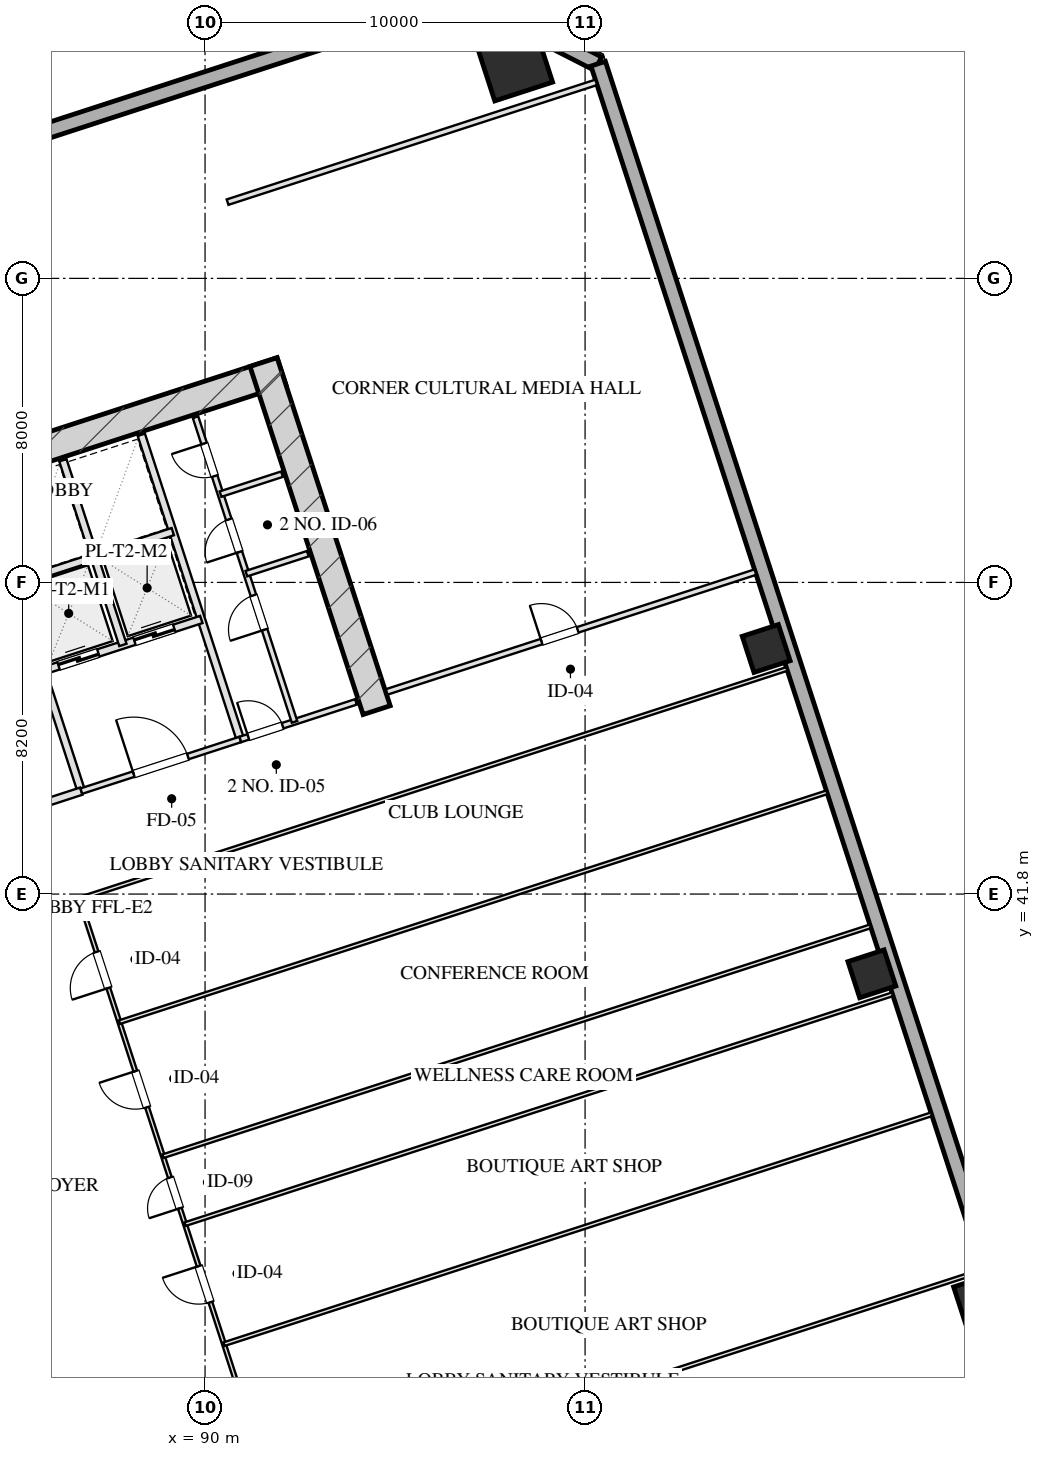
"""IFC4 building model, lengths in metres.
Left out: names, types, materials, properties, quantities, classifications, styles, units other than length and angle.
Written with IfcOpenShell. Run it as: python <this file> out.ifc"""

import sys

from ifc_helpers import new_model, si_unit, direction, frame, frame_2d, origin, origin_2d, place, context, subcontext, project, spatial, rectangle, hollow_rectangle, extrude, element, fill, save


model = new_model("IFC4")
c1 = context("Model", 3, precision=1e-05, world=origin(), true_north=direction((0.0, 1.0)))
c2 = subcontext(c1, "Body", "Model", "MODEL_VIEW")
j1 = project(units=[si_unit("LENGTHUNIT", "METRE"), si_unit("PLANEANGLEUNIT", "RADIAN")], contexts=[c1])
p1 = place(None, origin())
s1 = spatial("IfcSite", under=j1, at=p1, CompositionType="ELEMENT")
p2 = place(p1, origin())
s2 = spatial("IfcBuilding", under=s1, at=p2, CompositionType="ELEMENT")
p3 = place(p2, frame((0.0, 0.0, 74.75)))
s3 = spatial("IfcBuildingStorey", under=s2, at=p3, CompositionType="ELEMENT", Elevation=74.75)
p4 = place(p3, frame((76.272, 50.443, 0.0), z_axis=(0.0, 0.0, 1.0), x_axis=(0.951056072937, 0.309018358888, 0.0)))
e1 = element("IfcWall", 1, at=p4, inside=s3, PredefinedType="SHEAR", context=c2, shape_type="SweptSolid", body=[
    extrude(rectangle(XDim=16.55, YDim=0.75, at=frame_2d((8.275, 0.0))), origin(), (0.0, 0.0, 1.0), 3.45),
])
p5 = place(p3, frame((94.515, 46.639, 0.0), z_axis=(0.0, 0.0, 1.0), x_axis=(-0.309016134813, 0.951056795583, 0.0)))
e2 = element("IfcWall", 2, at=p5, inside=s3, PredefinedType="SHEAR", context=c2, shape_type="SweptSolid", body=[
    extrude(rectangle(XDim=9.63, YDim=0.75, at=frame_2d((4.815, 0.0))), origin(), (0.0, 0.0, 1.0), 3.45),
])
p6 = place(p3, frame((98.137, 63.677, 0.0), z_axis=(0.0, 0.0, 1.0), x_axis=(0.951056516295, 0.309016994375, 0.0)))
e3 = element("IfcColumn", 3, at=p6, inside=s3, PredefinedType="COLUMN", context=c2, shape_type="SweptSolid", body=[
    extrude(hollow_rectangle(XDim=1.6, YDim=1.6, WallThickness=0.055, at=origin_2d()), origin(), (0.0, 0.0, 1.0), 3.451),
])
for number, where, z_axis, x_axis in (
    (4, (110.328, 31.142, 0.0), (0.0, 0.0, 1.0), (0.951, 0.309, 0.0)),
    (5, (107.547, 39.701, 0.0), (0.0, 0.0, 1.0), (0.951, 0.309, 0.0)),
    (6, (104.766, 48.261, 0.0), (0.0, 0.0, 1.0), (0.951, 0.309, 0.0)),
):
    element("IfcColumn", number, at=place(p3, frame(where, z_axis=z_axis, x_axis=x_axis)), inside=s3, PredefinedType="COLUMN", context=c2, shape_type="SweptSolid", body=[
        extrude(hollow_rectangle(XDim=1.0, YDim=1.0, WallThickness=0.036, at=origin_2d()), origin(), (0.0, 0.0, 1.0), 3.451),
    ])
p7 = place(p3, frame((66.002, 55.433, 0.0), z_axis=(0.0, 0.0, 1.0), x_axis=(0.951055939317, 0.309018770125, 0.0)))
e7 = element("IfcWall", 7, at=p7, inside=s3, PredefinedType="SOLIDWALL", context=c2, shape_type="SweptSolid", body=[
    extrude(rectangle(XDim=32.4, YDim=0.4, at=frame_2d((16.2, 0.0))), origin(), (0.0, 0.0, 1.0), 2.61),
])
p8 = place(p3, frame((96.816, 65.446, 0.0), z_axis=(0.0, 0.0, 1.0), x_axis=(0.890998089617, -0.454007053137, 0.0)))
e8 = element("IfcWall", 8, at=p8, inside=s3, PredefinedType="SOLIDWALL", context=c2, shape_type="SweptSolid", body=[
    extrude(rectangle(XDim=3.96, YDim=0.4, at=frame_2d((1.98, 0.0))), origin(), (0.0, 0.0, 1.0), 2.61),
])
p9 = place(p3, frame((100.345, 63.648, 0.0), z_axis=(0.0, 0.0, 1.0), x_axis=(0.309014526607, -0.951057318118, 0.0)))
e9 = element("IfcWall", 9, at=p9, inside=s3, PredefinedType="SOLIDWALL", context=c2, shape_type="SweptSolid", body=[
    extrude(rectangle(XDim=50.0, YDim=0.4, at=frame_2d((25.0, 0.0))), origin(), (0.0, 0.0, 1.0), 2.61),
])
p10 = place(p3, frame((86.743, 44.508, 0.0), z_axis=(0.0, 0.0, 1.0), x_axis=(-0.309016001439, 0.951056838919, 0.0)))
e10 = element("IfcWall", 10, at=p10, inside=s3, PredefinedType="PARTITIONING", context=c2, shape_type="SweptSolid", body=[
    extrude(rectangle(XDim=8.43, YDim=0.2, at=frame_2d((4.215, 0.0))), origin(), (0.0, 0.0, 1.0), 3.175),
])
p11 = place(p3, frame((83.101, 43.324, 0.0), z_axis=(0.0, 0.0, 1.0), x_axis=(0.951052804469, 0.309028417967, 0.0)))
e11 = element("IfcWall", 11, at=p11, inside=s3, PredefinedType="PARTITIONING", context=c2, shape_type="SweptSolid", body=[
    extrude(rectangle(XDim=3.83, YDim=0.2, at=frame_2d((1.915, 0.0))), origin(), (0.0, 0.0, 1.0), 3.175),
])
p12 = place(p11, frame((1.35, 0.0, 0.0)))
e12 = element("IfcOpeningElement", 12, at=p12, cuts=e11, PredefinedType="OPENING", context=c2, shape_type="SweptSolid", body=[
    extrude(rectangle(XDim=1.2, YDim=2.05, at=frame_2d((0.6, 1.025))), frame((0.0, 0.11, 0.0), z_axis=(0.0, -1.0, 0.0), x_axis=(1.0, 0.0, 0.0)), (0.0, 0.0, 1.0), 0.22),
])
p13 = place(p3, frame((90.928, 45.868, 0.0), z_axis=(0.0, 0.0, 1.0), x_axis=(-0.309042196757, 0.951048327176, 0.0)))
e13 = element("IfcWall", 13, at=p13, inside=s3, PredefinedType="PARTITIONING", context=c2, shape_type="SweptSolid", body=[
    extrude(rectangle(XDim=8.43, YDim=0.2, at=frame_2d((4.215, 0.0))), origin(), (0.0, 0.0, 1.0), 3.175),
])
p14 = place(p3, frame((86.743, 44.508, 0.0), z_axis=(0.0, 0.0, 1.0), x_axis=(0.951063829732, 0.308994485023, 0.0)))
e14 = element("IfcWall", 14, at=p14, inside=s3, PredefinedType="PARTITIONING", context=c2, shape_type="SweptSolid", body=[
    extrude(rectangle(XDim=4.4, YDim=0.15, at=frame_2d((2.2, 0.0))), origin(), (0.0, 0.0, 1.0), 3.175),
])
p15 = place(p14, frame((1.45, 0.0, 0.0)))
e15 = element("IfcOpeningElement", 15, at=p15, cuts=e14, PredefinedType="OPENING", context=c2, shape_type="SweptSolid", body=[
    extrude(rectangle(XDim=1.5, YDim=2.05, at=frame_2d((0.75, 1.025))), frame((0.0, 0.085, 0.0), z_axis=(0.0, -1.0, 0.0), x_axis=(1.0, 0.0, 0.0)), (0.0, 0.0, 1.0), 0.17),
])
p16 = place(p3, frame((85.718, 47.666, 0.0), z_axis=(0.0, 0.0, 1.0), x_axis=(0.951058531764, 0.30901079133, 0.0)))
e16 = element("IfcWall", 16, at=p16, inside=s3, PredefinedType="PARTITIONING", context=c2, shape_type="SweptSolid", body=[
    extrude(rectangle(XDim=4.4, YDim=0.2, at=frame_2d((2.2, 0.0))), origin(), (0.0, 0.0, 1.0), 3.175),
])
p17 = place(p16, frame((0.45, 0.0, 0.0)))
e17 = element("IfcOpeningElement", 17, at=p17, cuts=e16, PredefinedType="OPENING", context=c2, shape_type="SweptSolid", body=[
    extrude(rectangle(XDim=1.1, YDim=2.05, at=frame_2d((0.55, 1.025))), frame((0.0, 0.11, 0.0), z_axis=(0.0, -1.0, 0.0), x_axis=(1.0, 0.0, 0.0)), (0.0, 0.0, 1.0), 0.22),
])
p18 = place(p16, frame((2.55, 0.0, 0.0)))
e18 = element("IfcOpeningElement", 18, at=p18, cuts=e16, PredefinedType="OPENING", context=c2, shape_type="SweptSolid", body=[
    extrude(rectangle(XDim=1.1, YDim=2.05, at=frame_2d((0.55, 1.025))), frame((0.0, 0.11, 0.0), z_axis=(0.0, -1.0, 0.0), x_axis=(1.0, 0.0, 0.0)), (0.0, 0.0, 1.0), 0.22),
])
p19 = place(p3, frame((87.838, 48.354, 0.0), z_axis=(0.0, 0.0, 1.0), x_axis=(-0.3090093719, 0.951058992953, 0.0)))
e19 = element("IfcWall", 19, at=p19, inside=s3, PredefinedType="PARTITIONING", context=c2, shape_type="SweptSolid", body=[
    extrude(rectangle(XDim=5.11, YDim=0.2, at=frame_2d((2.555, 0.0))), origin(), (0.0, 0.0, 1.0), 3.175),
])
p20 = place(p3, frame((84.967, 49.977, 0.0), z_axis=(0.0, 0.0, 1.0), x_axis=(0.951063829732, 0.308994485023, 0.0)))
e20 = element("IfcWall", 20, at=p20, inside=s3, PredefinedType="PARTITIONING", context=c2, shape_type="SweptSolid", body=[
    extrude(rectangle(XDim=4.4, YDim=0.2, at=frame_2d((2.2, 0.0))), origin(), (0.0, 0.0, 1.0), 3.175),
])
p21 = place(p3, frame((90.928, 45.868, 0.0), z_axis=(0.0, 0.0, 1.0), x_axis=(0.951059297078, 0.309008435874, 0.0)))
e21 = element("IfcWall", 21, at=p21, inside=s3, PredefinedType="PARTITIONING", context=c2, shape_type="SweptSolid", body=[
    extrude(rectangle(XDim=3.2, YDim=0.15, at=frame_2d((1.6, 0.0))), origin(), (0.0, 0.0, 1.0), 3.175),
])
p22 = place(p21, frame((0.22, 0.0, 0.0)))
e22 = element("IfcOpeningElement", 22, at=p22, cuts=e21, PredefinedType="OPENING", context=c2, shape_type="SweptSolid", body=[
    extrude(rectangle(XDim=0.95, YDim=2.05, at=frame_2d((0.475, 1.025))), frame((0.0, 0.085, 0.0), z_axis=(0.0, -1.0, 0.0), x_axis=(1.0, 0.0, 0.0)), (0.0, 0.0, 1.0), 0.17),
])
p23 = place(p3, frame((92.355, 46.331, 0.0), z_axis=(0.0, 0.0, 1.0), x_axis=(-0.309007490203, 0.951059604335, 0.0)))
e23 = element("IfcWall", 23, at=p23, inside=s3, PredefinedType="PARTITIONING", context=c2, shape_type="SweptSolid", body=[
    extrude(rectangle(XDim=8.43, YDim=0.15, at=frame_2d((4.215, 0.0))), origin(), (0.0, 0.0, 1.0), 3.175),
])
p24 = place(p23, frame((2.55, 0.0, 0.0)))
e24 = element("IfcOpeningElement", 24, at=p24, cuts=e23, PredefinedType="OPENING", context=c2, shape_type="SweptSolid", body=[
    extrude(rectangle(XDim=0.95, YDim=2.05, at=frame_2d((0.475, 1.025))), frame((0.0, 0.085, 0.0), z_axis=(0.0, -1.0, 0.0), x_axis=(1.0, 0.0, 0.0)), (0.0, 0.0, 1.0), 0.17),
])
p25 = place(p23, frame((4.7, 0.0, 0.0)))
e25 = element("IfcOpeningElement", 25, at=p25, cuts=e23, PredefinedType="OPENING", context=c2, shape_type="SweptSolid", body=[
    extrude(rectangle(XDim=0.9, YDim=2.05, at=frame_2d((0.45, 1.025))), frame((0.0, 0.085, 0.0), z_axis=(0.0, -1.0, 0.0), x_axis=(1.0, 0.0, 0.0)), (0.0, 0.0, 1.0), 0.17),
])
p26 = place(p23, frame((6.8, 0.0, 0.0)))
e26 = element("IfcOpeningElement", 26, at=p26, cuts=e23, PredefinedType="OPENING", context=c2, shape_type="SweptSolid", body=[
    extrude(rectangle(XDim=0.9, YDim=2.05, at=frame_2d((0.45, 1.025))), frame((0.0, 0.085, 0.0), z_axis=(0.0, -1.0, 0.0), x_axis=(1.0, 0.0, 0.0)), (0.0, 0.0, 1.0), 0.17),
])
p27 = place(p3, frame((91.088, 50.23, 0.0), z_axis=(0.0, 0.0, 1.0), x_axis=(0.951054116971, 0.309024378638, 0.0)))
e27 = element("IfcWall", 27, at=p27, inside=s3, PredefinedType="PARTITIONING", context=c2, shape_type="SweptSolid", body=[
    extrude(rectangle(XDim=1.7, YDim=0.15, at=frame_2d((0.85, 0.0))), origin(), (0.0, 0.0, 1.0), 3.175),
])
p28 = place(p3, frame((90.408, 52.323, 0.0), z_axis=(0.0, 0.0, 1.0), x_axis=(0.951040401051, 0.309066587596, 0.0)))
e28 = element("IfcWall", 28, at=p28, inside=s3, PredefinedType="PARTITIONING", context=c2, shape_type="SweptSolid", body=[
    extrude(rectangle(XDim=1.7, YDim=0.15, at=frame_2d((0.85, 0.0))), origin(), (0.0, 0.0, 1.0), 3.175),
])
p29 = place(p3, frame((101.578, 26.196, 0.0), z_axis=(0.0, 0.0, 1.0), x_axis=(0.951059043131, 0.309009217467, 0.0)))
e29 = element("IfcWall", 29, at=p29, inside=s3, PredefinedType="PARTITIONING", context=c2, shape_type="SweptSolid", body=[
    extrude(rectangle(XDim=10.2, YDim=0.15, at=frame_2d((5.1, 0.0))), origin(), (0.0, 0.0, 1.0), 2.15),
])
p30 = place(p29, frame((4.284, 0.0, 0.0)))
e30 = element("IfcOpeningElement", 30, at=p30, cuts=e29, PredefinedType="OPENING", context=c2, shape_type="SweptSolid", body=[
    extrude(rectangle(XDim=1.0, YDim=2.05, at=frame_2d((0.5, 1.025))), frame((0.0, 0.085, 0.0), z_axis=(0.0, -1.0, 0.0), x_axis=(1.0, 0.0, 0.0)), (0.0, 0.0, 1.0), 0.17),
])
p31 = place(p3, frame((90.593, 60.006, 0.0), z_axis=(0.0, 0.0, 1.0), x_axis=(0.951059043131, 0.309009217467, 0.0)))
e31 = element("IfcWall", 31, at=p31, inside=s3, PredefinedType="PARTITIONING", context=c2, shape_type="SweptSolid", body=[
    extrude(rectangle(XDim=10.2, YDim=0.15, at=frame_2d((5.1, 0.0))), origin(), (0.0, 0.0, 1.0), 3.175),
])
p32 = place(p3, frame((94.78, 47.119, 0.0), z_axis=(0.0, 0.0, 1.0), x_axis=(0.951054294345, 0.309023832749, 0.0)))
e32 = element("IfcWall", 32, at=p32, inside=s3, PredefinedType="PARTITIONING", context=c2, shape_type="SweptSolid", body=[
    extrude(rectangle(XDim=10.2, YDim=0.15, at=frame_2d((5.1, 0.0))), origin(), (0.0, 0.0, 1.0), 2.15),
])
p33 = place(p32, frame((4.284, 0.0, 0.0)))
e33 = element("IfcOpeningElement", 33, at=p33, cuts=e32, PredefinedType="OPENING", context=c2, shape_type="SweptSolid", body=[
    extrude(rectangle(XDim=1.0, YDim=2.05, at=frame_2d((0.5, 1.025))), frame((0.0, 0.085, 0.0), z_axis=(0.0, -1.0, 0.0), x_axis=(1.0, 0.0, 0.0)), (0.0, 0.0, 1.0), 0.17),
])
for number, where, z_axis, x_axis in (
    (34, (91.834, 25.848, 0.0), (0.0, 0.0, 1.0), (0.951, 0.309, 0.0)),
    (35, (86.692, 41.673, 0.0), (0.0, 0.0, 1.0), (0.951, 0.309, 0.0)),
):
    element("IfcWall", number, at=place(p3, frame(where, z_axis=z_axis, x_axis=x_axis)), inside=s3, PredefinedType="MOVABLE", context=c2, shape_type="SweptSolid", body=[
        extrude(rectangle(XDim=19.575, YDim=0.1, at=frame_2d((9.788, 0.0))), origin(), (0.0, 0.0, 1.0), 3.175),
    ])
p34 = place(p3, frame((87.412, 24.411, 0.0), z_axis=(0.0, 0.0, 1.0), x_axis=(-0.309022042254, 0.951054876125, 0.0)))
e36 = element("IfcWall", 36, at=p34, inside=s3, PredefinedType="MOVABLE", context=c2, shape_type="SweptSolid", body=[
    extrude(rectangle(XDim=16.64, YDim=0.1, at=frame_2d((8.32, 0.0))), origin(), (0.0, 0.0, 1.0), 3.175),
])
p35 = place(p34, frame((3.32, 0.0, 0.0)))
e37 = element("IfcOpeningElement", 37, at=p35, cuts=e36, PredefinedType="OPENING", context=c2, shape_type="SweptSolid", body=[
    extrude(rectangle(XDim=1.0, YDim=2.05, at=frame_2d((0.5, 1.025))), frame((0.0, 0.06, 0.0), z_axis=(0.0, -1.0, 0.0), x_axis=(1.0, 0.0, 0.0)), (0.0, 0.0, 1.0), 0.12),
])
p36 = place(p34, frame((11.64, 0.0, 0.0)))
e38 = element("IfcOpeningElement", 38, at=p36, cuts=e36, PredefinedType="OPENING", context=c2, shape_type="SweptSolid", body=[
    extrude(rectangle(XDim=1.0, YDim=2.05, at=frame_2d((0.5, 1.025))), frame((0.0, 0.06, 0.0), z_axis=(0.0, -1.0, 0.0), x_axis=(1.0, 0.0, 0.0)), (0.0, 0.0, 1.0), 0.12),
])
p37 = place(p3, frame((91.834, 25.848, 0.0), z_axis=(0.0, 0.0, 1.0), x_axis=(-0.30901773025, 0.951056277195, 0.0)))
e39 = element("IfcWall", 39, at=p37, inside=s3, PredefinedType="MOVABLE", context=c2, shape_type="SweptSolid", body=[
    extrude(rectangle(XDim=16.64, YDim=0.1, at=frame_2d((8.32, 0.0))), origin(), (0.0, 0.0, 1.0), 3.175),
])
p38 = place(p37, frame((1.16, 0.0, 0.0)))
e40 = element("IfcOpeningElement", 40, at=p38, cuts=e39, PredefinedType="OPENING", context=c2, shape_type="SweptSolid", body=[
    extrude(rectangle(XDim=1.05, YDim=2.05, at=frame_2d((0.525, 1.025))), frame((0.0, 0.06, 0.0), z_axis=(0.0, -1.0, 0.0), x_axis=(1.0, 0.0, 0.0)), (0.0, 0.0, 1.0), 0.12),
])
p39 = place(p37, frame((5.48, 0.0, 0.0)))
e41 = element("IfcOpeningElement", 41, at=p39, cuts=e39, PredefinedType="OPENING", context=c2, shape_type="SweptSolid", body=[
    extrude(rectangle(XDim=1.0, YDim=2.05, at=frame_2d((0.5, 1.025))), frame((0.0, 0.06, 0.0), z_axis=(0.0, -1.0, 0.0), x_axis=(1.0, 0.0, 0.0)), (0.0, 0.0, 1.0), 0.12),
])
p40 = place(p37, frame((8.08, 0.0, 0.0)))
e42 = element("IfcOpeningElement", 42, at=p40, cuts=e39, PredefinedType="OPENING", context=c2, shape_type="SweptSolid", body=[
    extrude(rectangle(XDim=0.85, YDim=2.05, at=frame_2d((0.425, 1.025))), frame((0.0, 0.06, 0.0), z_axis=(0.0, -1.0, 0.0), x_axis=(1.0, 0.0, 0.0)), (0.0, 0.0, 1.0), 0.12),
])
p41 = place(p37, frame((10.874, 0.0, 0.0)))
e43 = element("IfcOpeningElement", 43, at=p41, cuts=e39, PredefinedType="OPENING", context=c2, shape_type="SweptSolid", body=[
    extrude(rectangle(XDim=1.0, YDim=2.05, at=frame_2d((0.5, 1.025))), frame((0.0, 0.06, 0.0), z_axis=(0.0, -1.0, 0.0), x_axis=(1.0, 0.0, 0.0)), (0.0, 0.0, 1.0), 0.12),
])
p42 = place(p37, frame((14.174, 0.0, 0.0)))
e44 = element("IfcOpeningElement", 44, at=p42, cuts=e39, PredefinedType="OPENING", context=c2, shape_type="SweptSolid", body=[
    extrude(rectangle(XDim=1.0, YDim=2.05, at=frame_2d((0.5, 1.025))), frame((0.0, 0.06, 0.0), z_axis=(0.0, -1.0, 0.0), x_axis=(1.0, 0.0, 0.0)), (0.0, 0.0, 1.0), 0.12),
])
for number, where, z_axis, x_axis in (
    (45, (90.499, 29.956, 0.0), (0.0, 0.0, 1.0), (0.951, 0.309, 0.0)),
    (46, (89.473, 33.114, 0.0), (0.0, 0.0, 1.0), (0.951, 0.309, 0.0)),
    (47, (88.892, 34.902, 0.0), (0.0, 0.0, 1.0), (0.951, 0.309, 0.0)),
    (48, (87.746, 38.429, 0.0), (0.0, 0.0, 1.0), (0.951, 0.309, 0.0)),
):
    element("IfcWall", number, at=place(p3, frame(where, z_axis=z_axis, x_axis=x_axis)), inside=s3, PredefinedType="MOVABLE", context=c2, shape_type="SweptSolid", body=[
        extrude(rectangle(XDim=19.575, YDim=0.1, at=frame_2d((9.788, 0.0))), origin(), (0.0, 0.0, 1.0), 3.175),
    ])
p43 = place(p15, origin())
e49 = element("IfcDoor", 49, at=p43, inside=s3, OperationType="SINGLE_SWING_LEFT", PredefinedType="DOOR", context=c2, shape_type="SweptSolid", body=[
    extrude(rectangle(XDim=1.5, YDim=2.05, at=frame_2d((0.75, 1.025))), frame((0.0, 0.025, 0.0), z_axis=(0.0, -1.0, 0.0), x_axis=(1.0, 0.0, 0.0)), (0.0, 0.0, 1.0), 0.05),
])
fill(e15, e49)
p44 = place(p17, origin())
e50 = element("IfcDoor", 50, at=p44, inside=s3, OperationType="DOUBLE_DOOR_SLIDING", PredefinedType="DOOR", context=c2, shape_type="SweptSolid", body=[
    extrude(rectangle(XDim=1.1, YDim=2.05, at=frame_2d((0.55, 1.025))), frame((0.0, 0.025, 0.0), z_axis=(0.0, -1.0, 0.0), x_axis=(1.0, 0.0, 0.0)), (0.0, 0.0, 1.0), 0.05),
])
fill(e17, e50)
p45 = place(p18, origin())
e51 = element("IfcDoor", 51, at=p45, inside=s3, OperationType="DOUBLE_DOOR_SLIDING", PredefinedType="DOOR", context=c2, shape_type="SweptSolid", body=[
    extrude(rectangle(XDim=1.1, YDim=2.05, at=frame_2d((0.55, 1.025))), frame((0.0, 0.025, 0.0), z_axis=(0.0, -1.0, 0.0), x_axis=(1.0, 0.0, 0.0)), (0.0, 0.0, 1.0), 0.05),
])
fill(e18, e51)
p46 = place(p22, origin())
e52 = element("IfcDoor", 52, at=p46, inside=s3, OperationType="SINGLE_SWING_LEFT", PredefinedType="DOOR", context=c2, shape_type="SweptSolid", body=[
    extrude(rectangle(XDim=0.95, YDim=2.05, at=frame_2d((0.475, 1.025))), frame((0.0, 0.025, 0.0), z_axis=(0.0, -1.0, 0.0), x_axis=(1.0, 0.0, 0.0)), (0.0, 0.0, 1.0), 0.05),
])
fill(e22, e52)
p47 = place(p24, origin())
e53 = element("IfcDoor", 53, at=p47, inside=s3, OperationType="SINGLE_SWING_LEFT", PredefinedType="DOOR", context=c2, shape_type="SweptSolid", body=[
    extrude(rectangle(XDim=0.95, YDim=2.05, at=frame_2d((0.475, 1.025))), frame((0.0, 0.025, 0.0), z_axis=(0.0, -1.0, 0.0), x_axis=(1.0, 0.0, 0.0)), (0.0, 0.0, 1.0), 0.05),
])
fill(e24, e53)
p48 = place(p25, origin())
e54 = element("IfcDoor", 54, at=p48, inside=s3, OperationType="SINGLE_SWING_LEFT", PredefinedType="DOOR", context=c2, shape_type="SweptSolid", body=[
    extrude(rectangle(XDim=0.9, YDim=2.05, at=frame_2d((0.45, 1.025))), frame((0.0, 0.025, 0.0), z_axis=(0.0, -1.0, 0.0), x_axis=(1.0, 0.0, 0.0)), (0.0, 0.0, 1.0), 0.05),
])
fill(e25, e54)
p49 = place(p26, origin())
e55 = element("IfcDoor", 55, at=p49, inside=s3, OperationType="SINGLE_SWING_RIGHT", PredefinedType="DOOR", context=c2, shape_type="SweptSolid", body=[
    extrude(rectangle(XDim=0.9, YDim=2.05, at=frame_2d((0.45, 1.025))), frame((0.0, 0.025, 0.0), z_axis=(0.0, -1.0, 0.0), x_axis=(1.0, 0.0, 0.0)), (0.0, 0.0, 1.0), 0.05),
])
fill(e26, e55)
p50 = place(p33, origin())
e56 = element("IfcDoor", 56, at=p50, inside=s3, OperationType="SINGLE_SWING_LEFT", PredefinedType="DOOR", context=c2, shape_type="SweptSolid", body=[
    extrude(rectangle(XDim=1.0, YDim=2.05, at=frame_2d((0.5, 1.025))), frame((0.0, 0.025, 0.0), z_axis=(0.0, -1.0, 0.0), x_axis=(1.0, 0.0, 0.0)), (0.0, 0.0, 1.0), 0.05),
])
fill(e33, e56)
p51 = place(p39, origin())
e57 = element("IfcDoor", 57, at=p51, inside=s3, OperationType="SINGLE_SWING_RIGHT", PredefinedType="DOOR", context=c2, shape_type="SweptSolid", body=[
    extrude(rectangle(XDim=1.0, YDim=2.05, at=frame_2d((0.5, 1.025))), frame((0.0, 0.025, 0.0), z_axis=(0.0, -1.0, 0.0), x_axis=(1.0, 0.0, 0.0)), (0.0, 0.0, 1.0), 0.05),
])
fill(e41, e57)
p52 = place(p40, origin())
e58 = element("IfcDoor", 58, at=p52, inside=s3, OperationType="SINGLE_SWING_LEFT", PredefinedType="DOOR", context=c2, shape_type="SweptSolid", body=[
    extrude(rectangle(XDim=0.85, YDim=2.05, at=frame_2d((0.425, 1.025))), frame((0.0, 0.025, 0.0), z_axis=(0.0, -1.0, 0.0), x_axis=(1.0, 0.0, 0.0)), (0.0, 0.0, 1.0), 0.05),
])
fill(e42, e58)
p53 = place(p41, origin())
e59 = element("IfcDoor", 59, at=p53, inside=s3, OperationType="SINGLE_SWING_RIGHT", PredefinedType="DOOR", context=c2, shape_type="SweptSolid", body=[
    extrude(rectangle(XDim=1.0, YDim=2.05, at=frame_2d((0.5, 1.025))), frame((0.0, 0.025, 0.0), z_axis=(0.0, -1.0, 0.0), x_axis=(1.0, 0.0, 0.0)), (0.0, 0.0, 1.0), 0.05),
])
fill(e43, e59)
p54 = place(p42, origin())
e60 = element("IfcDoor", 60, at=p54, inside=s3, OperationType="SINGLE_SWING_LEFT", PredefinedType="DOOR", context=c2, shape_type="SweptSolid", body=[
    extrude(rectangle(XDim=1.0, YDim=2.05, at=frame_2d((0.5, 1.025))), frame((0.0, 0.025, 0.0), z_axis=(0.0, -1.0, 0.0), x_axis=(1.0, 0.0, 0.0)), (0.0, 0.0, 1.0), 0.05),
])
fill(e44, e60)
save(model, sys.argv[1])
